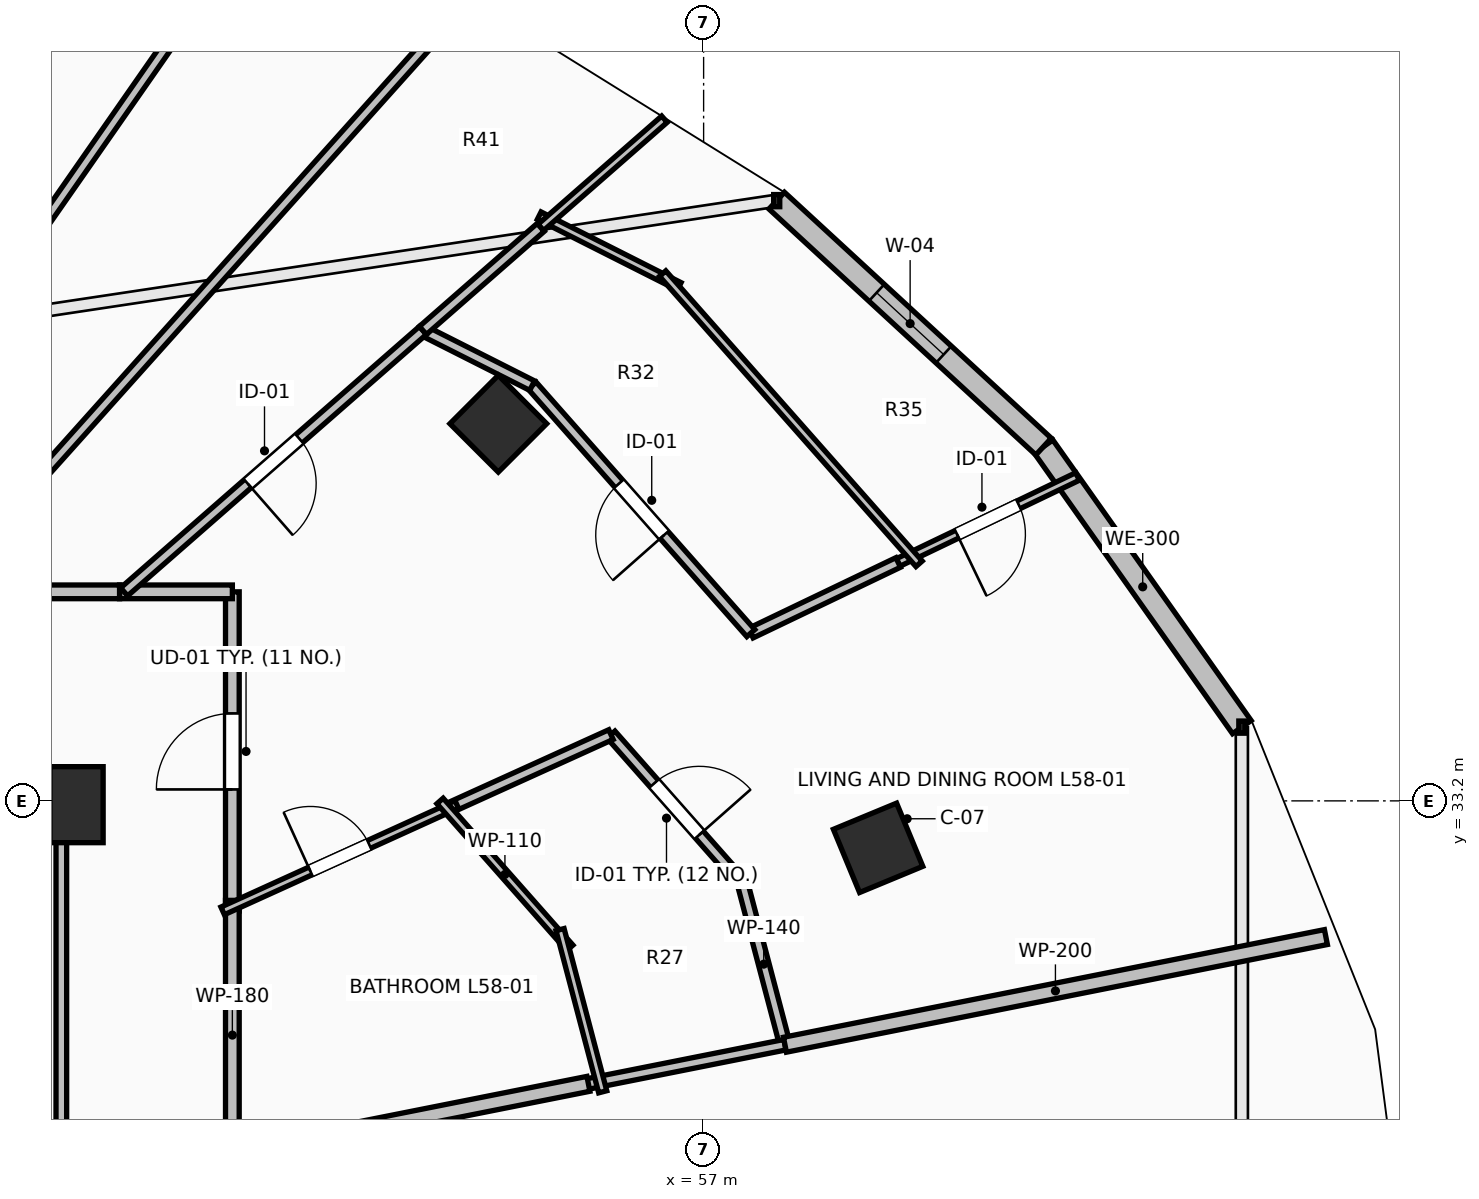
"""IFC4 building model, lengths in metres.
Left out: names, types, materials, properties, quantities, classifications, styles, units other than length and angle.
Written with IfcOpenShell. Run it as: python <this file> out.ifc"""

import sys

from ifc_helpers import new_model, si_unit, direction, frame, frame_2d, origin, origin_2d, place, context, subcontext, project, spatial, rectangle, extrude, element, fill, save


model = new_model("IFC4")
c1 = context("Model", 3, precision=1e-05, world=origin(), true_north=direction((0.0, 1.0)))
c2 = subcontext(c1, "Body", "Model", "MODEL_VIEW")
j1 = project(units=[si_unit("LENGTHUNIT", "METRE"), si_unit("PLANEANGLEUNIT", "RADIAN")], contexts=[c1])
p1 = place(None, origin())
s1 = spatial("IfcSite", under=j1, at=p1, CompositionType="ELEMENT")
p2 = place(p1, origin())
s2 = spatial("IfcBuilding", under=s1, at=p2, CompositionType="ELEMENT")
p3 = place(p2, frame((0.0, 0.0, 214.3)))
s3 = spatial("IfcBuildingStorey", under=s2, at=p3, CompositionType="ELEMENT", Elevation=214.3)
for number, where, z_axis, x_axis in (
    (1, (59.295, 32.582, 0.0), (0.0, 0.0, 1.0), (0.924, 0.383, 0.0)),
    (2, (54.299, 38.162, 0.0), (0.0, 0.0, 1.0), (0.707, 0.707, 0.0)),
):
    element("IfcColumn", number, at=place(p3, frame(where, z_axis=z_axis, x_axis=x_axis)), inside=s3, PredefinedType="COLUMN", context=c2, shape_type="SweptSolid", body=[
        extrude(rectangle(XDim=0.9, YDim=0.9, at=origin_2d()), origin(), (0.0, 0.0, 1.0), 3.55),
    ])
p4 = place(p3, frame((48.75, 33.15, 0.0), z_axis=(0.0, 0.0, 1.0), x_axis=(1.0, 0.0, 0.0)))
e3 = element("IfcColumn", 3, at=p4, inside=s3, PredefinedType="PILASTER", context=c2, shape_type="SweptSolid", body=[
    extrude(rectangle(XDim=0.7, YDim=1.0, at=origin_2d()), origin(), (0.0, 0.0, 1.0), 3.55),
])
p5 = place(p3, frame((64.081, 34.17, 0.0), z_axis=(0.0, 0.0, 1.0), x_axis=(-0.577168747264, 0.81662490605, 0.0)))
e4 = element("IfcWall", 4, at=p5, inside=s3, PredefinedType="STANDARD", context=c2, shape_type="SweptSolid", body=[
    extrude(rectangle(XDim=4.52, YDim=0.3, at=frame_2d((2.26, 0.0))), origin(), (0.0, 0.0, 1.0), 3.29),
])
p6 = place(p3, frame((61.472, 37.861, 0.0), z_axis=(0.0, 0.0, 1.0), x_axis=(-0.735359993374, 0.677676678177, 0.0)))
e5 = element("IfcWall", 5, at=p6, inside=s3, PredefinedType="STANDARD", context=c2, shape_type="SweptSolid", body=[
    extrude(rectangle(XDim=4.774, YDim=0.3, at=frame_2d((2.387, 0.0))), origin(), (0.0, 0.0, 1.0), 3.29),
])
p7 = place(p6, frame((1.787, 0.0, 0.85)))
e6 = element("IfcOpeningElement", 6, at=p7, cuts=e5, PredefinedType="OPENING", context=c2, shape_type="SweptSolid", body=[
    extrude(rectangle(XDim=1.2, YDim=2.1, at=frame_2d((0.6, 1.05))), frame((0.0, 0.165, 0.0), z_axis=(0.0, -1.0, 0.0), x_axis=(1.0, 0.0, 0.0)), (0.0, 0.0, 1.0), 0.33),
])
p8 = place(p3, frame((50.8, 31.751, 0.0), z_axis=(0.0, 0.0, 1.0), x_axis=(0.0, 1.0, 0.0)))
e7 = element("IfcWall", 7, at=p8, inside=s3, PredefinedType="PARTITIONING", context=c2, shape_type="SweptSolid", body=[
    extrude(rectangle(XDim=4.199, YDim=0.18, at=frame_2d((2.1, 0.0))), origin(), (0.0, 0.0, 1.0), 2.482),
])
p9 = place(p8, frame((1.6, 0.0, 0.0)))
e8 = element("IfcOpeningElement", 8, at=p9, cuts=e7, PredefinedType="OPENING", context=c2, shape_type="SweptSolid", body=[
    extrude(rectangle(XDim=1.0, YDim=2.15, at=frame_2d((0.5, 1.075))), frame((0.0, 0.105, 0.0), z_axis=(0.0, -1.0, 0.0), x_axis=(1.0, 0.0, 0.0)), (0.0, 0.0, 1.0), 0.21),
])
p10 = place(p3, frame((50.8, 35.95, 0.0), z_axis=(0.0, 0.0, 1.0), x_axis=(-1.0, 0.0, 0.0)))
e9 = element("IfcWall", 9, at=p10, inside=s3, PredefinedType="PARTITIONING", context=c2, shape_type="SweptSolid", body=[
    extrude(rectangle(XDim=1.484, YDim=0.18, at=frame_2d((0.742, 0.0))), origin(), (0.0, 0.0, 1.0), 3.29),
])
p11 = place(p3, frame((50.8, 28.346, 0.0), z_axis=(0.0, 0.0, 1.0), x_axis=(0.0, 1.0, 0.0)))
e10 = element("IfcWall", 10, at=p11, inside=s3, PredefinedType="PARTITIONING", context=c2, shape_type="SweptSolid", body=[
    extrude(rectangle(XDim=3.545, YDim=0.18, at=frame_2d((1.772, 0.0))), origin(), (0.0, 0.0, 1.0), 3.29),
])
p12 = place(p3, frame((49.316, 35.95, 0.0), z_axis=(0.0, 0.0, 1.0), x_axis=(-1.0, 0.0, 0.0)))
e11 = element("IfcWall", 11, at=p12, inside=s3, PredefinedType="PARTITIONING", context=c2, shape_type="SweptSolid", body=[
    extrude(rectangle(XDim=2.464, YDim=0.18, at=frame_2d((1.232, 0.0))), origin(), (0.0, 0.0, 1.0), 2.482),
])
p13 = place(p3, frame((55.781, 34.072, 0.0), z_axis=(0.0, 0.0, 1.0), x_axis=(0.661961245166, -0.749538064343, 0.0)))
e12 = element("IfcWall", 12, at=p13, inside=s3, PredefinedType="PARTITIONING", context=c2, shape_type="SweptSolid", body=[
    extrude(rectangle(XDim=2.615, YDim=0.14, at=frame_2d((1.308, 0.0))), origin(), (0.0, 0.0, 1.0), 2.482),
])
p14 = place(p13, frame((0.857, 0.0, 0.0)))
e13 = element("IfcOpeningElement", 13, at=p14, cuts=e12, PredefinedType="OPENING", context=c2, shape_type="SweptSolid", body=[
    extrude(rectangle(XDim=0.9, YDim=2.1, at=frame_2d((0.45, 1.05))), frame((0.0, 0.085, 0.0), z_axis=(0.0, -1.0, 0.0), x_axis=(1.0, 0.0, 0.0)), (0.0, 0.0, 1.0), 0.17),
])
p15 = place(p3, frame((57.512, 32.112, 0.0), z_axis=(0.0, 0.0, 1.0), x_axis=(0.254570039115, -0.967054339314, 0.0)))
e14 = element("IfcWall", 14, at=p15, inside=s3, PredefinedType="PARTITIONING", context=c2, shape_type="SweptSolid", body=[
    extrude(rectangle(XDim=2.192, YDim=0.14, at=frame_2d((1.096, 0.0))), origin(), (0.0, 0.0, 1.0), 3.29),
])
p16 = place(p3, frame((58.07, 29.992, 0.0), z_axis=(0.0, 0.0, 1.0), x_axis=(-0.98076287284, -0.19520293865, 0.0)))
e15 = element("IfcWall", 15, at=p16, inside=s3, PredefinedType="PARTITIONING", context=c2, shape_type="SweptSolid", body=[
    extrude(rectangle(XDim=2.777, YDim=0.14, at=frame_2d((1.388, 0.0))), origin(), (0.0, 0.0, 1.0), 2.936),
])
p17 = place(p3, frame((53.625, 33.094, 0.0), z_axis=(0.0, 0.0, 1.0), x_axis=(0.910680528551, 0.413111334773, 0.0)))
e16 = element("IfcWall", 16, at=p17, inside=s3, PredefinedType="PARTITIONING", context=c2, shape_type="SweptSolid", body=[
    extrude(rectangle(XDim=2.367, YDim=0.14, at=frame_2d((1.184, 0.0))), origin(), (0.0, 0.0, 1.0), 2.482),
])
p18 = place(p3, frame((50.673, 31.753, 0.0), z_axis=(0.0, 0.0, 1.0), x_axis=(0.910504846956, 0.413498396212, 0.0)))
e17 = element("IfcWall", 17, at=p18, inside=s3, PredefinedType="PARTITIONING", context=c2, shape_type="SweptSolid", body=[
    extrude(rectangle(XDim=3.383, YDim=0.11, at=frame_2d((1.691, 0.0))), origin(), (0.0, 0.0, 1.0), 2.482),
])
p19 = place(p18, frame((1.266, 0.0, 0.0)))
e18 = element("IfcOpeningElement", 18, at=p19, cuts=e17, PredefinedType="OPENING", context=c2, shape_type="SweptSolid", body=[
    extrude(rectangle(XDim=0.85, YDim=2.1, at=frame_2d((0.425, 1.05))), frame((0.0, 0.07, 0.0), z_axis=(0.0, -1.0, 0.0), x_axis=(1.0, 0.0, 0.0)), (0.0, 0.0, 1.0), 0.14),
])
p20 = place(p3, frame((61.919, 37.468, 0.0), z_axis=(0.0, 0.0, 1.0), x_axis=(-0.901731167672, -0.432297237151, 0.0)))
e19 = element("IfcWall", 19, at=p20, inside=s3, PredefinedType="PARTITIONING", context=c2, shape_type="SweptSolid", body=[
    extrude(rectangle(XDim=2.616, YDim=0.11, at=frame_2d((1.308, 0.0))), origin(), (0.0, 0.0, 1.0), 3.29),
])
p21 = place(p20, frame((0.858, 0.0, 0.0)))
e20 = element("IfcOpeningElement", 20, at=p21, cuts=e19, PredefinedType="OPENING", context=c2, shape_type="SweptSolid", body=[
    extrude(rectangle(XDim=0.9, YDim=2.1, at=frame_2d((0.45, 1.05))), frame((0.0, 0.07, 0.0), z_axis=(0.0, -1.0, 0.0), x_axis=(1.0, 0.0, 0.0)), (0.0, 0.0, 1.0), 0.14),
])
p22 = place(p3, frame((59.56, 36.336, 0.0), z_axis=(0.0, 0.0, 1.0), x_axis=(-0.901730274491, -0.432299100238, 0.0)))
e21 = element("IfcWall", 21, at=p22, inside=s3, PredefinedType="PARTITIONING", context=c2, shape_type="SweptSolid", body=[
    extrude(rectangle(XDim=2.15, YDim=0.14, at=frame_2d((1.075, 0.0))), origin(), (0.0, 0.0, 1.0), 3.29),
])
p23 = place(p3, frame((57.621, 35.407, 0.0), z_axis=(0.0, 0.0, 1.0), x_axis=(-0.662160377652, 0.749362151612, 0.0)))
e22 = element("IfcWall", 22, at=p23, inside=s3, PredefinedType="PARTITIONING", context=c2, shape_type="SweptSolid", body=[
    extrude(rectangle(XDim=4.345, YDim=0.14, at=frame_2d((2.173, 0.0))), origin(), (0.0, 0.0, 1.0), 3.29),
])
p24 = place(p23, frame((1.722, 0.0, 0.0)))
e23 = element("IfcOpeningElement", 23, at=p24, cuts=e22, PredefinedType="OPENING", context=c2, shape_type="SweptSolid", body=[
    extrude(rectangle(XDim=0.9, YDim=2.1, at=frame_2d((0.45, 1.05))), frame((0.0, 0.085, 0.0), z_axis=(0.0, -1.0, 0.0), x_axis=(1.0, 0.0, 0.0)), (0.0, 0.0, 1.0), 0.17),
])
p25 = place(p3, frame((54.744, 38.663, 0.0), z_axis=(0.0, 0.0, 1.0), x_axis=(-0.892600010283, 0.450849444541, 0.0)))
e24 = element("IfcWall", 24, at=p25, inside=s3, PredefinedType="PARTITIONING", context=c2, shape_type="SweptSolid", body=[
    extrude(rectangle(XDim=1.61, YDim=0.14, at=frame_2d((0.805, 0.0))), origin(), (0.0, 0.0, 1.0), 3.29),
])
p26 = place(p3, frame((53.307, 39.389, 0.0), z_axis=(0.0, 0.0, 1.0), x_axis=(-0.752631709834, -0.658441728137, 0.0)))
e25 = element("IfcWall", 25, at=p26, inside=s3, PredefinedType="PARTITIONING", context=c2, shape_type="SweptSolid", body=[
    extrude(rectangle(XDim=5.223, YDim=0.14, at=frame_2d((2.611, 0.0))), origin(), (0.0, 0.0, 1.0), 2.824),
])
p27 = place(p26, frame((2.162, 0.0, 0.0)))
e26 = element("IfcOpeningElement", 26, at=p27, cuts=e25, PredefinedType="OPENING", context=c2, shape_type="SweptSolid", body=[
    extrude(rectangle(XDim=0.9, YDim=2.1, at=frame_2d((0.45, 1.05))), frame((0.0, 0.085, 0.0), z_axis=(0.0, -1.0, 0.0), x_axis=(1.0, 0.0, 0.0)), (0.0, 0.0, 1.0), 0.17),
])
p28 = place(p3, frame((58.07, 29.992, 0.0), z_axis=(0.0, 0.0, 1.0), x_axis=(0.980769147175, 0.19517141171, 0.0)))
e27 = element("IfcWall", 27, at=p28, inside=s3, PredefinedType="PARTITIONING", context=c2, shape_type="SweptSolid", body=[
    extrude(rectangle(XDim=7.257, YDim=0.2, at=frame_2d((3.628, 0.0))), origin(), (0.0, 0.0, 1.0), 2.824),
])
p29 = place(p3, frame((53.532, 33.199, 0.0), z_axis=(0.0, 0.0, 1.0), x_axis=(0.662069232061, -0.749442680902, 0.0)))
e28 = element("IfcWall", 28, at=p29, inside=s3, PredefinedType="PARTITIONING", context=c2, shape_type="SweptSolid", body=[
    extrude(rectangle(XDim=2.579, YDim=0.11, at=frame_2d((1.29, 0.0))), origin(), (0.0, 0.0, 1.0), 2.482),
])
p30 = place(p3, frame((55.111, 31.506, 0.0), z_axis=(0.0, 0.0, 1.0), x_axis=(0.254389812051, -0.967101764823, 0.0)))
e29 = element("IfcWall", 29, at=p30, inside=s3, PredefinedType="PARTITIONING", context=c2, shape_type="SweptSolid", body=[
    extrude(rectangle(XDim=2.206, YDim=0.11, at=frame_2d((1.103, 0.0))), origin(), (0.0, 0.0, 1.0), 3.29),
])
p31 = place(p3, frame((50.663, 28.519, 0.0), z_axis=(0.0, 0.0, 1.0), x_axis=(0.980809211653, 0.194969972909, 0.0)))
e30 = element("IfcWall", 30, at=p31, inside=s3, PredefinedType="PARTITIONING", context=c2, shape_type="SweptSolid", body=[
    extrude(rectangle(XDim=4.916, YDim=0.2, at=frame_2d((2.458, 0.0))), origin(), (0.0, 0.0, 1.0), 2.979),
])
p32 = place(p3, frame((54.837, 40.899, 0.0), z_axis=(0.0, 0.0, 1.0), x_axis=(0.892645505641, -0.450759360701, 0.0)))
e31 = element("IfcWall", 31, at=p32, inside=s3, PredefinedType="PARTITIONING", context=c2, shape_type="SweptSolid", body=[
    extrude(rectangle(XDim=2.063, YDim=0.11, at=frame_2d((1.032, 0.0))), origin(), (0.0, 0.0, 1.0), 3.29),
])
p33 = place(p3, frame((56.461, 40.137, 0.0), z_axis=(0.0, 0.0, 1.0), x_axis=(0.662153993881, -0.749367792467, 0.0)))
e32 = element("IfcWall", 32, at=p33, inside=s3, PredefinedType="PARTITIONING", context=c2, shape_type="SweptSolid", body=[
    extrude(rectangle(XDim=5.095, YDim=0.11, at=frame_2d((2.547, 0.0))), origin(), (0.0, 0.0, 1.0), 3.29),
])
p34 = place(p3, frame((56.484, 42.168, 0.0), z_axis=(0.0, 0.0, 1.0), x_axis=(-0.752555717051, -0.658528581562, 0.0)))
e33 = element("IfcWall", 33, at=p34, inside=s3, PredefinedType="PARTITIONING", context=c2, shape_type="SweptSolid", body=[
    extrude(rectangle(XDim=2.163, YDim=0.11, at=frame_2d((1.082, 0.0))), origin(), (0.0, 0.0, 1.0), 3.29),
])
p35 = place(p3, frame((54.856, 40.744, 0.0), z_axis=(0.0, 0.0, 1.0), x_axis=(-0.752679548168, -0.658387042528, 0.0)))
e34 = element("IfcWall", 34, at=p35, inside=s3, PredefinedType="PARTITIONING", context=c2, shape_type="SweptSolid", body=[
    extrude(rectangle(XDim=2.058, YDim=0.14, at=frame_2d((1.029, 0.0))), origin(), (0.0, 0.0, 1.0), 3.29),
])
p36 = place(p3, frame((53.822, 43.665, 0.0), z_axis=(0.0, 0.0, 1.0), x_axis=(-0.667166856079, -0.74490830721, 0.0)))
e35 = element("IfcWall", 35, at=p36, inside=s3, PredefinedType="PARTITIONING", context=c2, shape_type="SweptSolid", body=[
    extrude(rectangle(XDim=10.357, YDim=0.14, at=frame_2d((5.179, 0.0))), origin(), (0.0, 0.0, 1.0), 2.482),
])
p37 = place(p3, frame((51.099, 44.795, 0.0), z_axis=(0.0, 0.0, 1.0), x_axis=(-0.571754326018, -0.82042488424, 0.0)))
e36 = element("IfcWall", 36, at=p37, inside=s3, PredefinedType="PARTITIONING", context=c2, shape_type="SweptSolid", body=[
    extrude(rectangle(XDim=10.781, YDim=0.14, at=frame_2d((5.391, 0.0))), origin(), (0.0, 0.0, 1.0), 2.482),
])
p38 = place(p3, frame((48.482, 45.797, 0.0), z_axis=(0.0, 0.0, 1.0), x_axis=(-0.46793402924, -0.883763398359, 0.0)))
e37 = element("IfcWall", 37, at=p38, inside=s3, PredefinedType="PARTITIONING", context=c2, shape_type="SweptSolid", body=[
    extrude(rectangle(XDim=11.142, YDim=0.14, at=frame_2d((5.571, 0.0))), origin(), (0.0, 0.0, 1.0), 2.824),
])
p39 = place(p3, frame((48.55, 28.196, 0.0), z_axis=(0.0, 0.0, 1.0), x_axis=(0.0, 1.0, 0.0)))
e38 = element("IfcWall", 38, at=p39, inside=s3, PredefinedType="PARTITIONING", context=c2, shape_type="SweptSolid", body=[
    extrude(rectangle(XDim=5.254, YDim=0.14, at=frame_2d((2.627, 0.0))), origin(), (0.0, 0.0, 1.0), 2.482),
])
p40 = place(p3, frame((48.55, 33.45, 0.0), z_axis=(0.0, 0.0, 1.0), x_axis=(-1.0, 0.0, 0.0)))
e39 = element("IfcWall", 39, at=p40, inside=s3, PredefinedType="PARTITIONING", context=c2, shape_type="SweptSolid", body=[
    extrude(rectangle(XDim=4.21, YDim=0.14, at=frame_2d((2.105, 0.0))), origin(), (0.0, 0.0, 1.0), 2.482),
])
p41 = place(p7, origin())
e40 = element("IfcWindow", 40, at=p41, inside=s3, PartitioningType="SINGLE_PANEL", PredefinedType="WINDOW", context=c2, shape_type="SweptSolid", body=[
    extrude(rectangle(XDim=1.2, YDim=2.1, at=frame_2d((0.6, 1.05))), frame((0.0, 0.03, 0.0), z_axis=(0.0, -1.0, 0.0), x_axis=(1.0, 0.0, 0.0)), (0.0, 0.0, 1.0), 0.06),
])
fill(e6, e40)
p42 = place(p9, origin())
e41 = element("IfcDoor", 41, at=p42, inside=s3, OperationType="SINGLE_SWING_LEFT", PredefinedType="DOOR", context=c2, shape_type="SweptSolid", body=[
    extrude(rectangle(XDim=1.0, YDim=2.15, at=frame_2d((0.5, 1.075))), frame((0.0, 0.025, 0.0), z_axis=(0.0, -1.0, 0.0), x_axis=(1.0, 0.0, 0.0)), (0.0, 0.0, 1.0), 0.05),
])
fill(e8, e41)
p43 = place(p14, origin())
e42 = element("IfcDoor", 42, at=p43, inside=s3, OperationType="SINGLE_SWING_RIGHT", PredefinedType="DOOR", context=c2, shape_type="SweptSolid", body=[
    extrude(rectangle(XDim=0.9, YDim=2.1, at=frame_2d((0.45, 1.05))), frame((0.0, 0.025, 0.0), z_axis=(0.0, -1.0, 0.0), x_axis=(1.0, 0.0, 0.0)), (0.0, 0.0, 1.0), 0.05),
])
fill(e13, e42)
p44 = place(p19, origin())
e43 = element("IfcDoor", 43, at=p44, inside=s3, OperationType="SINGLE_SWING_LEFT", PredefinedType="DOOR", context=c2, shape_type="SweptSolid", body=[
    extrude(rectangle(XDim=0.85, YDim=2.1, at=frame_2d((0.425, 1.05))), frame((0.0, 0.025, 0.0), z_axis=(0.0, -1.0, 0.0), x_axis=(1.0, 0.0, 0.0)), (0.0, 0.0, 1.0), 0.05),
])
fill(e18, e43)
p45 = place(p21, origin())
e44 = element("IfcDoor", 44, at=p45, inside=s3, OperationType="SINGLE_SWING_RIGHT", PredefinedType="DOOR", context=c2, shape_type="SweptSolid", body=[
    extrude(rectangle(XDim=0.9, YDim=2.1, at=frame_2d((0.45, 1.05))), frame((0.0, 0.025, 0.0), z_axis=(0.0, -1.0, 0.0), x_axis=(1.0, 0.0, 0.0)), (0.0, 0.0, 1.0), 0.05),
])
fill(e20, e44)
p46 = place(p24, origin())
e45 = element("IfcDoor", 45, at=p46, inside=s3, OperationType="SINGLE_SWING_LEFT", PredefinedType="DOOR", context=c2, shape_type="SweptSolid", body=[
    extrude(rectangle(XDim=0.9, YDim=2.1, at=frame_2d((0.45, 1.05))), frame((0.0, 0.025, 0.0), z_axis=(0.0, -1.0, 0.0), x_axis=(1.0, 0.0, 0.0)), (0.0, 0.0, 1.0), 0.05),
])
fill(e23, e45)
p47 = place(p27, origin())
e46 = element("IfcDoor", 46, at=p47, inside=s3, OperationType="SINGLE_SWING_RIGHT", PredefinedType="DOOR", context=c2, shape_type="SweptSolid", body=[
    extrude(rectangle(XDim=0.9, YDim=2.1, at=frame_2d((0.45, 1.05))), frame((0.0, 0.025, 0.0), z_axis=(0.0, -1.0, 0.0), x_axis=(1.0, 0.0, 0.0)), (0.0, 0.0, 1.0), 0.05),
])
fill(e26, e46)
save(model, sys.argv[1])
